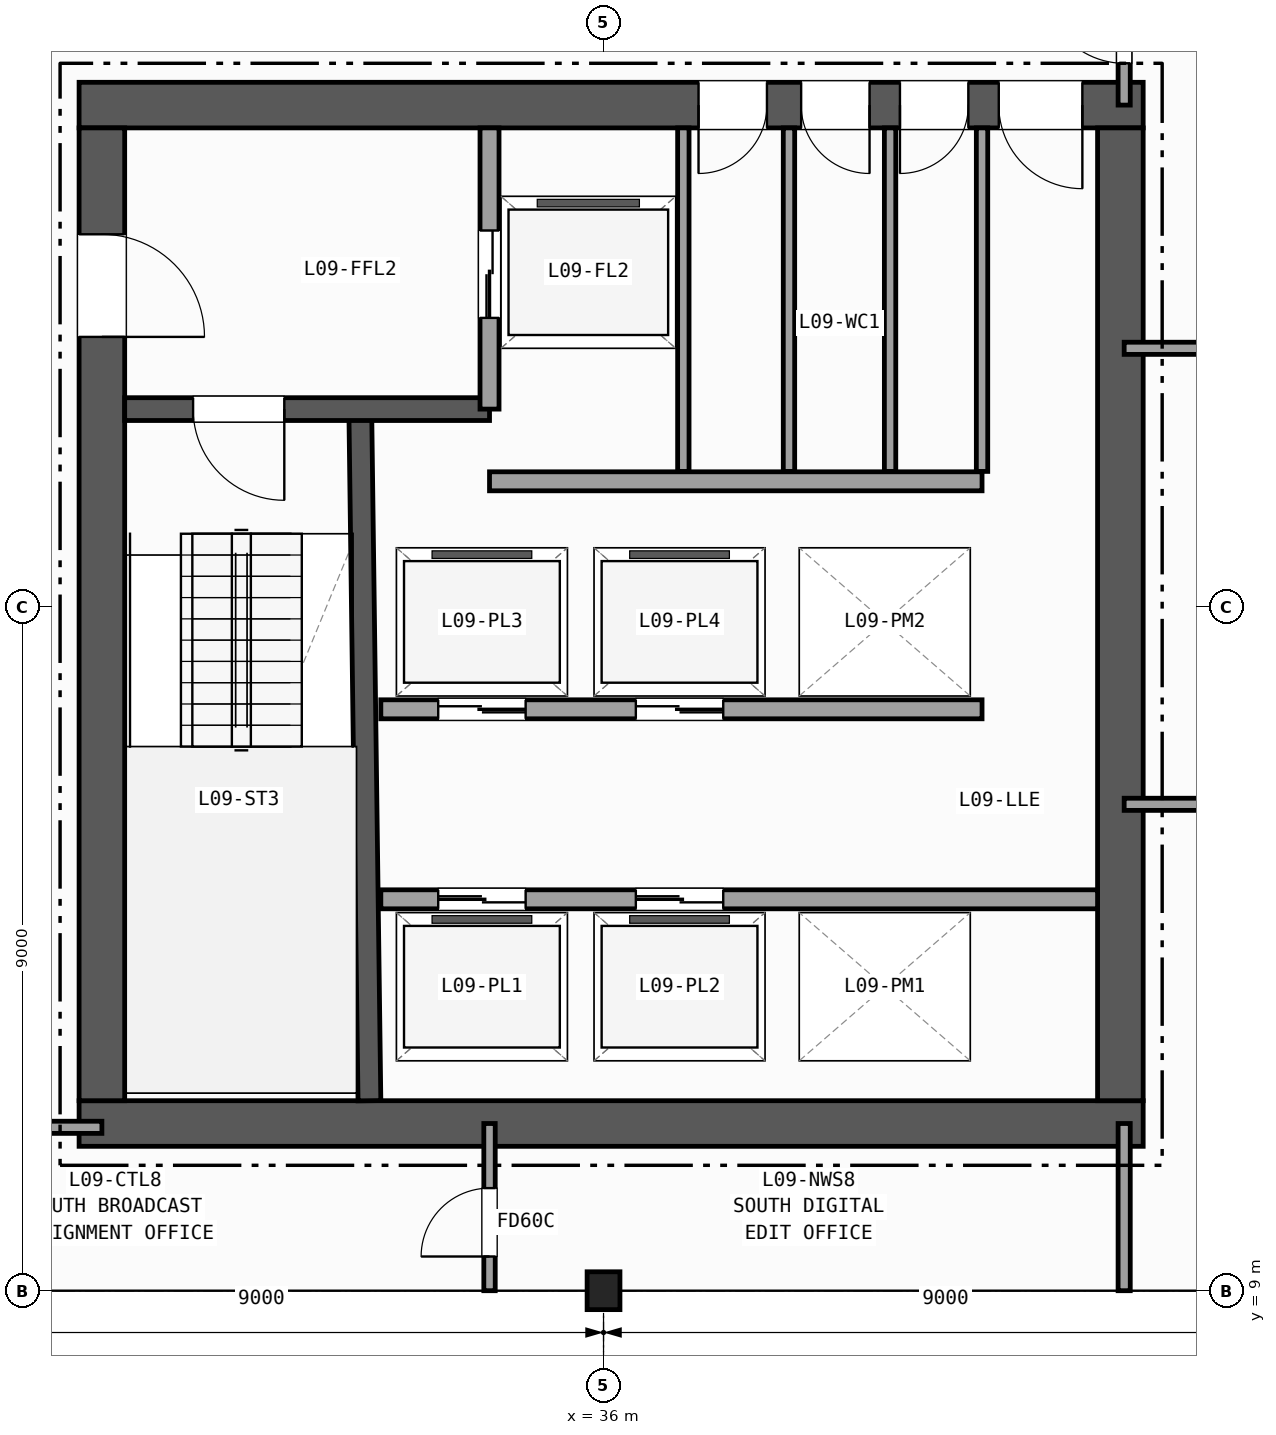
"""IFC4 building model, lengths in metres.
Left out: names, types, materials, properties, quantities, classifications, styles, units other than length and angle.
Written with IfcOpenShell. Run it as: python <this file> out.ifc"""

import sys

from ifc_helpers import new_model, si_unit, direction, frame, frame_2d, origin, origin_2d, place, context, subcontext, project, spatial, rectangle, i_section, extrude, element, fill, save


model = new_model("IFC4")
c1 = context("Model", 3, precision=1e-05, world=origin(), true_north=direction((0.0, 1.0)))
c2 = subcontext(c1, "Body", "Model", "MODEL_VIEW")
j1 = project(units=[si_unit("LENGTHUNIT", "METRE"), si_unit("PLANEANGLEUNIT", "RADIAN")], contexts=[c1])
p1 = place(None, origin())
s1 = spatial("IfcSite", under=j1, at=p1, CompositionType="ELEMENT")
p2 = place(p1, origin())
s2 = spatial("IfcBuilding", under=s1, at=p2, CompositionType="ELEMENT")
p3 = place(p2, frame((0.0, 0.0, 43.4)))
s3 = spatial("IfcBuildingStorey", under=s2, at=p3, CompositionType="ELEMENT", Elevation=43.4)
p4 = place(p3, frame((36.0, 9.0, 0.0), z_axis=(0.0, 0.0, 1.0), x_axis=(1.0, 0.0, 0.0)))
e1 = element("IfcColumn", 1, at=p4, inside=s3, PredefinedType="COLUMN", context=c2, shape_type="SweptSolid", body=[
    extrude(i_section(OverallWidth=0.432, OverallDepth=0.498, WebThickness=0.056, FlangeThickness=0.089, FilletRadius=0.015, at=origin_2d()), origin(), (0.0, 0.0, 1.0), 3.7),
])
p5 = place(p3, frame((29.1, 11.2, 0.0), z_axis=(0.0, 0.0, 1.0), x_axis=(1.0, 0.0, 0.0)))
e2 = element("IfcWall", 2, at=p5, inside=s3, PredefinedType="SHEAR", context=c2, shape_type="SweptSolid", body=[
    extrude(rectangle(XDim=14.0, YDim=0.6, at=frame_2d((7.0, 0.0))), origin(), (0.0, 0.0, 1.0), 3.42),
])
p6 = place(p3, frame((43.1, 24.6, 0.0), z_axis=(0.0, 0.0, 1.0), x_axis=(-1.0, 0.0, 0.0)))
e3 = element("IfcWall", 3, at=p6, inside=s3, PredefinedType="SHEAR", context=c2, shape_type="SweptSolid", body=[
    extrude(rectangle(XDim=14.0, YDim=0.6, at=frame_2d((7.0, 0.0))), origin(), (0.0, 0.0, 1.0), 3.42),
])
p7 = place(p6, frame((0.8, 0.0, 0.0)))
e4 = element("IfcOpeningElement", 4, at=p7, cuts=e3, PredefinedType="OPENING", context=c2, shape_type="SweptSolid", body=[
    extrude(rectangle(XDim=1.1, YDim=2.15, at=frame_2d((0.55, 1.075))), frame((0.0, 0.31, 0.0), z_axis=(0.0, -1.0, 0.0), x_axis=(1.0, 0.0, 0.0)), (0.0, 0.0, 1.0), 0.62),
])
p8 = place(p6, frame((2.3, 0.0, 0.0)))
e5 = element("IfcOpeningElement", 5, at=p8, cuts=e3, PredefinedType="OPENING", context=c2, shape_type="SweptSolid", body=[
    extrude(rectangle(XDim=0.9, YDim=2.1, at=frame_2d((0.45, 1.05))), frame((0.0, 0.31, 0.0), z_axis=(0.0, -1.0, 0.0), x_axis=(1.0, 0.0, 0.0)), (0.0, 0.0, 1.0), 0.62),
])
p9 = place(p6, frame((3.6, 0.0, 0.0)))
e6 = element("IfcOpeningElement", 6, at=p9, cuts=e3, PredefinedType="OPENING", context=c2, shape_type="SweptSolid", body=[
    extrude(rectangle(XDim=0.9, YDim=2.1, at=frame_2d((0.45, 1.05))), frame((0.0, 0.31, 0.0), z_axis=(0.0, -1.0, 0.0), x_axis=(1.0, 0.0, 0.0)), (0.0, 0.0, 1.0), 0.62),
])
p10 = place(p6, frame((4.95, 0.0, 0.0)))
e7 = element("IfcOpeningElement", 7, at=p10, cuts=e3, PredefinedType="OPENING", context=c2, shape_type="SweptSolid", body=[
    extrude(rectangle(XDim=0.9, YDim=2.1, at=frame_2d((0.45, 1.05))), frame((0.0, 0.31, 0.0), z_axis=(0.0, -1.0, 0.0), x_axis=(1.0, 0.0, 0.0)), (0.0, 0.0, 1.0), 0.62),
])
p11 = place(p3, frame((29.4, 24.3, 0.0), z_axis=(0.0, 0.0, 1.0), x_axis=(0.0, -1.0, 0.0)))
e8 = element("IfcWall", 8, at=p11, inside=s3, PredefinedType="SHEAR", context=c2, shape_type="SweptSolid", body=[
    extrude(rectangle(XDim=12.8, YDim=0.6, at=frame_2d((6.4, 0.0))), origin(), (0.0, 0.0, 1.0), 3.42),
])
p12 = place(p11, frame((1.4, 0.0, 0.0)))
e9 = element("IfcOpeningElement", 9, at=p12, cuts=e8, PredefinedType="OPENING", context=c2, shape_type="SweptSolid", body=[
    extrude(rectangle(XDim=1.35, YDim=2.15, at=frame_2d((0.675, 1.075))), frame((0.0, 0.31, 0.0), z_axis=(0.0, -1.0, 0.0), x_axis=(1.0, 0.0, 0.0)), (0.0, 0.0, 1.0), 0.62),
])
p13 = place(p3, frame((42.8, 11.5, 0.0), z_axis=(0.0, 0.0, 1.0), x_axis=(0.0, 1.0, 0.0)))
e10 = element("IfcWall", 10, at=p13, inside=s3, PredefinedType="SHEAR", context=c2, shape_type="SweptSolid", body=[
    extrude(rectangle(XDim=12.8, YDim=0.6, at=frame_2d((6.4, 0.0))), origin(), (0.0, 0.0, 1.0), 3.42),
])
p14 = place(p3, frame((32.92, 11.5, 0.0), z_axis=(0.0, 0.0, 1.0), x_axis=(-0.013244407292, 0.999912288991, 0.0)))
e11 = element("IfcWall", 11, at=p14, inside=s3, PredefinedType="SHEAR", context=c2, shape_type="SweptSolid", body=[
    extrude(rectangle(XDim=9.051, YDim=0.3, at=frame_2d((4.525, 0.0))), origin(), (0.0, 0.0, 1.0), 3.42),
])
p15 = place(p3, frame((34.5, 20.6, 0.0), z_axis=(0.0, 0.0, 1.0), x_axis=(-1.0, 0.0, 0.0)))
e12 = element("IfcWall", 12, at=p15, inside=s3, PredefinedType="SHEAR", context=c2, shape_type="SweptSolid", body=[
    extrude(rectangle(XDim=4.8, YDim=0.3, at=frame_2d((2.4, 0.0))), origin(), (0.0, 0.0, 1.0), 3.42),
])
p16 = place(p15, frame((2.7, 0.0, 0.0)))
e13 = element("IfcOpeningElement", 13, at=p16, cuts=e12, PredefinedType="OPENING", context=c2, shape_type="SweptSolid", body=[
    extrude(rectangle(XDim=1.2, YDim=2.15, at=frame_2d((0.6, 1.075))), frame((0.0, 0.16, 0.0), z_axis=(0.0, -1.0, 0.0), x_axis=(1.0, 0.0, 0.0)), (0.0, 0.0, 1.0), 0.32),
])
p17 = place(p3, frame((34.5, 20.6, 0.0), z_axis=(0.0, 0.0, 1.0), x_axis=(0.0, 1.0, 0.0)))
e14 = element("IfcWall", 14, at=p17, inside=s3, PredefinedType="PARTITIONING", context=c2, shape_type="SweptSolid", body=[
    extrude(rectangle(XDim=3.7, YDim=0.25, at=frame_2d((1.85, 0.0))), origin(), (0.0, 0.0, 1.0), 3.42),
])
p18 = place(p17, frame((1.2, 0.0, 0.0)))
e15 = element("IfcOpeningElement", 15, at=p18, cuts=e14, PredefinedType="OPENING", context=c2, shape_type="SweptSolid", body=[
    extrude(rectangle(XDim=1.15, YDim=2.15, at=frame_2d((0.575, 1.075))), frame((0.0, 0.135, 0.0), z_axis=(0.0, -1.0, 0.0), x_axis=(1.0, 0.0, 0.0)), (0.0, 0.0, 1.0), 0.27),
])
p19 = place(p3, frame((34.5, 19.65, 0.0), z_axis=(0.0, 0.0, 1.0), x_axis=(1.0, 0.0, 0.0)))
e16 = element("IfcWall", 16, at=p19, inside=s3, PredefinedType="PARTITIONING", context=c2, shape_type="SweptSolid", body=[
    extrude(rectangle(XDim=6.48, YDim=0.25, at=frame_2d((3.24, 0.0))), origin(), (0.0, 0.0, 1.0), 3.42),
])
p20 = place(p3, frame((33.07, 14.15, 0.0), z_axis=(0.0, 0.0, 1.0), x_axis=(1.0, 0.0, 0.0)))
e17 = element("IfcWall", 17, at=p20, inside=s3, PredefinedType="PARTITIONING", context=c2, shape_type="SweptSolid", body=[
    extrude(rectangle(XDim=9.43, YDim=0.25, at=frame_2d((4.715, 0.0))), origin(), (0.0, 0.0, 1.0), 3.42),
])
p21 = place(p20, frame((0.755, 0.0, 0.0)))
e18 = element("IfcOpeningElement", 18, at=p21, cuts=e17, PredefinedType="OPENING", context=c2, shape_type="SweptSolid", body=[
    extrude(rectangle(XDim=1.15, YDim=2.15, at=frame_2d((0.575, 1.075))), frame((0.0, 0.135, 0.0), z_axis=(0.0, -1.0, 0.0), x_axis=(1.0, 0.0, 0.0)), (0.0, 0.0, 1.0), 0.27),
])
p22 = place(p20, frame((3.355, 0.0, 0.0)))
e19 = element("IfcOpeningElement", 19, at=p22, cuts=e17, PredefinedType="OPENING", context=c2, shape_type="SweptSolid", body=[
    extrude(rectangle(XDim=1.15, YDim=2.15, at=frame_2d((0.575, 1.075))), frame((0.0, 0.135, 0.0), z_axis=(0.0, -1.0, 0.0), x_axis=(1.0, 0.0, 0.0)), (0.0, 0.0, 1.0), 0.27),
])
p23 = place(p3, frame((40.98, 16.65, 0.0), z_axis=(0.0, 0.0, 1.0), x_axis=(-1.0, 0.0, 0.0)))
e20 = element("IfcWall", 20, at=p23, inside=s3, PredefinedType="PARTITIONING", context=c2, shape_type="SweptSolid", body=[
    extrude(rectangle(XDim=7.91, YDim=0.25, at=frame_2d((3.955, 0.0))), origin(), (0.0, 0.0, 1.0), 3.42),
])
p24 = place(p23, frame((6.005, 0.0, 0.0)))
e21 = element("IfcOpeningElement", 21, at=p24, cuts=e20, PredefinedType="OPENING", context=c2, shape_type="SweptSolid", body=[
    extrude(rectangle(XDim=1.15, YDim=2.15, at=frame_2d((0.575, 1.075))), frame((0.0, 0.135, 0.0), z_axis=(0.0, -1.0, 0.0), x_axis=(1.0, 0.0, 0.0)), (0.0, 0.0, 1.0), 0.27),
])
p25 = place(p23, frame((3.405, 0.0, 0.0)))
e22 = element("IfcOpeningElement", 22, at=p25, cuts=e20, PredefinedType="OPENING", context=c2, shape_type="SweptSolid", body=[
    extrude(rectangle(XDim=1.15, YDim=2.15, at=frame_2d((0.575, 1.075))), frame((0.0, 0.135, 0.0), z_axis=(0.0, -1.0, 0.0), x_axis=(1.0, 0.0, 0.0)), (0.0, 0.0, 1.0), 0.27),
])
for number, where, z_axis, x_axis in (
    (23, (37.05, 19.78, 0.0), (0.0, 0.0, 1.0), (0.0, 1.0, 0.0)),
    (24, (38.44, 19.78, 0.0), (0.0, 0.0, 1.0), (0.0, 1.0, 0.0)),
    (25, (39.77, 19.78, 0.0), (0.0, 0.0, 1.0), (0.0, 1.0, 0.0)),
    (26, (40.98, 19.78, 0.0), (0.0, 0.0, 1.0), (0.0, 1.0, 0.0)),
):
    element("IfcWall", number, at=place(p3, frame(where, z_axis=z_axis, x_axis=x_axis)), inside=s3, PredefinedType="PARTITIONING", context=c2, shape_type="SweptSolid", body=[
        extrude(rectangle(XDim=4.52, YDim=0.15, at=frame_2d((2.26, 0.0))), origin(), (0.0, 0.0, 1.0), 3.42),
    ])
p26 = place(p3, frame((24.65, 11.15, 0.0), z_axis=(0.0, 0.0, 1.0), x_axis=(1.0, 0.0, 0.0)))
e27 = element("IfcWall", 27, at=p26, inside=s3, PredefinedType="PARTITIONING", context=c2, shape_type="SweptSolid", body=[
    extrude(rectangle(XDim=4.75, YDim=0.16, at=frame_2d((2.375, 0.0))), origin(), (0.0, 0.0, 1.0), 2.792),
])
p27 = place(p26, frame((1.2, 0.0, 0.0)))
e28 = element("IfcOpeningElement", 28, at=p27, cuts=e27, PredefinedType="OPENING", context=c2, shape_type="SweptSolid", body=[
    extrude(rectangle(XDim=0.95, YDim=2.1, at=frame_2d((0.475, 1.05))), frame((0.0, 0.09, 0.0), z_axis=(0.0, -1.0, 0.0), x_axis=(1.0, 0.0, 0.0)), (0.0, 0.0, 1.0), 0.18),
])
p28 = place(p3, frame((34.5, 9.0, 0.0), z_axis=(0.0, 0.0, 1.0), x_axis=(0.0, 1.0, 0.0)))
e29 = element("IfcWall", 29, at=p28, inside=s3, PredefinedType="PARTITIONING", context=c2, shape_type="SweptSolid", body=[
    extrude(rectangle(XDim=2.2, YDim=0.15, at=frame_2d((1.1, 0.0))), origin(), (0.0, 0.0, 1.0), 2.627),
])
p29 = place(p28, frame((0.45, 0.0, 0.0)))
e30 = element("IfcOpeningElement", 30, at=p29, cuts=e29, PredefinedType="OPENING", context=c2, shape_type="SweptSolid", body=[
    extrude(rectangle(XDim=0.9, YDim=2.1, at=frame_2d((0.45, 1.05))), frame((0.0, 0.085, 0.0), z_axis=(0.0, -1.0, 0.0), x_axis=(1.0, 0.0, 0.0)), (0.0, 0.0, 1.0), 0.17),
])
p30 = place(p3, frame((42.85, 9.0, 0.0), z_axis=(0.0, 0.0, 1.0), x_axis=(0.0, 1.0, 0.0)))
e31 = element("IfcWall", 31, at=p30, inside=s3, PredefinedType="PARTITIONING", context=c2, shape_type="SweptSolid", body=[
    extrude(rectangle(XDim=2.2, YDim=0.16, at=frame_2d((1.1, 0.0))), origin(), (0.0, 0.0, 1.0), 2.627),
])
p31 = place(p3, frame((42.85, 24.6, 0.0), z_axis=(0.0, 0.0, 1.0), x_axis=(0.0, 1.0, 0.0)))
e32 = element("IfcWall", 32, at=p31, inside=s3, PredefinedType="PARTITIONING", context=c2, shape_type="SweptSolid", body=[
    extrude(rectangle(XDim=2.4, YDim=0.16, at=frame_2d((1.2, 0.0))), origin(), (0.0, 0.0, 1.0), 2.627),
])
p32 = place(p31, frame((0.55, 0.0, 0.0)))
e33 = element("IfcOpeningElement", 33, at=p32, cuts=e32, PredefinedType="OPENING", context=c2, shape_type="SweptSolid", body=[
    extrude(rectangle(XDim=1.05, YDim=2.15, at=frame_2d((0.525, 1.075))), frame((0.0, 0.09, 0.0), z_axis=(0.0, -1.0, 0.0), x_axis=(1.0, 0.0, 0.0)), (0.0, 0.0, 1.0), 0.18),
])
p33 = place(p3, frame((42.85, 15.4, 0.0), z_axis=(0.0, 0.0, 1.0), x_axis=(1.0, 0.0, 0.0)))
e34 = element("IfcWall", 34, at=p33, inside=s3, PredefinedType="PARTITIONING", context=c2, shape_type="SweptSolid", body=[
    extrude(rectangle(XDim=20.582, YDim=0.16, at=frame_2d((10.291, 0.0))), origin(), (0.0, 0.0, 1.0), 3.42),
])
p34 = place(p33, frame((3.4, 0.0, 0.0)))
e35 = element("IfcOpeningElement", 35, at=p34, cuts=e34, PredefinedType="OPENING", context=c2, shape_type="SweptSolid", body=[
    extrude(rectangle(XDim=1.2, YDim=2.15, at=frame_2d((0.6, 1.075))), frame((0.0, 0.09, 0.0), z_axis=(0.0, -1.0, 0.0), x_axis=(1.0, 0.0, 0.0)), (0.0, 0.0, 1.0), 0.18),
])
p35 = place(p3, frame((42.85, 21.4, 0.0), z_axis=(0.0, 0.0, 1.0), x_axis=(1.0, 0.0, 0.0)))
e36 = element("IfcWall", 36, at=p35, inside=s3, PredefinedType="PARTITIONING", context=c2, shape_type="SweptSolid", body=[
    extrude(rectangle(XDim=20.5, YDim=0.16, at=frame_2d((10.25, 0.0))), origin(), (0.0, 0.0, 1.0), 3.42),
])
p36 = place(p35, frame((3.4, 0.0, 0.0)))
e37 = element("IfcOpeningElement", 37, at=p36, cuts=e36, PredefinedType="OPENING", context=c2, shape_type="SweptSolid", body=[
    extrude(rectangle(XDim=0.86, YDim=2.05, at=frame_2d((0.43, 1.025))), frame((0.0, 0.09, 0.0), z_axis=(0.0, -1.0, 0.0), x_axis=(1.0, 0.0, 0.0)), (0.0, 0.0, 1.0), 0.18),
])
p37 = place(p16, origin())
e38 = element("IfcDoor", 38, at=p37, inside=s3, OperationType="SINGLE_SWING_LEFT", PredefinedType="DOOR", context=c2, shape_type="SweptSolid", body=[
    extrude(rectangle(XDim=1.2, YDim=2.15, at=frame_2d((0.6, 1.075))), frame((0.0, 0.025, 0.0), z_axis=(0.0, -1.0, 0.0), x_axis=(1.0, 0.0, 0.0)), (0.0, 0.0, 1.0), 0.05),
])
fill(e13, e38)
p38 = place(p12, origin())
e39 = element("IfcDoor", 39, at=p38, inside=s3, OperationType="SINGLE_SWING_RIGHT", PredefinedType="DOOR", context=c2, shape_type="SweptSolid", body=[
    extrude(rectangle(XDim=1.35, YDim=2.15, at=frame_2d((0.675, 1.075))), frame((0.0, 0.025, 0.0), z_axis=(0.0, -1.0, 0.0), x_axis=(1.0, 0.0, 0.0)), (0.0, 0.0, 1.0), 0.05),
])
fill(e9, e39)
p39 = place(p7, origin())
e40 = element("IfcDoor", 40, at=p39, inside=s3, OperationType="SINGLE_SWING_LEFT", PredefinedType="DOOR", context=c2, shape_type="SweptSolid", body=[
    extrude(rectangle(XDim=1.1, YDim=2.15, at=frame_2d((0.55, 1.075))), frame((0.0, 0.025, 0.0), z_axis=(0.0, -1.0, 0.0), x_axis=(1.0, 0.0, 0.0)), (0.0, 0.0, 1.0), 0.05),
])
fill(e4, e40)
p40 = place(p8, origin())
e41 = element("IfcDoor", 41, at=p40, inside=s3, OperationType="SINGLE_SWING_RIGHT", PredefinedType="DOOR", context=c2, shape_type="SweptSolid", body=[
    extrude(rectangle(XDim=0.9, YDim=2.1, at=frame_2d((0.45, 1.05))), frame((0.0, 0.025, 0.0), z_axis=(0.0, -1.0, 0.0), x_axis=(1.0, 0.0, 0.0)), (0.0, 0.0, 1.0), 0.05),
])
fill(e5, e41)
p41 = place(p9, origin())
e42 = element("IfcDoor", 42, at=p41, inside=s3, OperationType="SINGLE_SWING_LEFT", PredefinedType="DOOR", context=c2, shape_type="SweptSolid", body=[
    extrude(rectangle(XDim=0.9, YDim=2.1, at=frame_2d((0.45, 1.05))), frame((0.0, 0.025, 0.0), z_axis=(0.0, -1.0, 0.0), x_axis=(1.0, 0.0, 0.0)), (0.0, 0.0, 1.0), 0.05),
])
fill(e6, e42)
p42 = place(p10, origin())
e43 = element("IfcDoor", 43, at=p42, inside=s3, OperationType="SINGLE_SWING_RIGHT", PredefinedType="DOOR", context=c2, shape_type="SweptSolid", body=[
    extrude(rectangle(XDim=0.9, YDim=2.1, at=frame_2d((0.45, 1.05))), frame((0.0, 0.025, 0.0), z_axis=(0.0, -1.0, 0.0), x_axis=(1.0, 0.0, 0.0)), (0.0, 0.0, 1.0), 0.05),
])
fill(e7, e43)
p43 = place(p18, origin())
e44 = element("IfcDoor", 44, at=p43, inside=s3, OperationType="DOUBLE_DOOR_SLIDING", PredefinedType="DOOR", context=c2, shape_type="SweptSolid", body=[
    extrude(rectangle(XDim=1.15, YDim=2.15, at=frame_2d((0.575, 1.075))), frame((0.0, 0.025, 0.0), z_axis=(0.0, -1.0, 0.0), x_axis=(1.0, 0.0, 0.0)), (0.0, 0.0, 1.0), 0.05),
])
fill(e15, e44)
p44 = place(p21, origin())
e45 = element("IfcDoor", 45, at=p44, inside=s3, OperationType="DOUBLE_DOOR_SLIDING", PredefinedType="DOOR", context=c2, shape_type="SweptSolid", body=[
    extrude(rectangle(XDim=1.15, YDim=2.15, at=frame_2d((0.575, 1.075))), frame((0.0, 0.025, 0.0), z_axis=(0.0, -1.0, 0.0), x_axis=(1.0, 0.0, 0.0)), (0.0, 0.0, 1.0), 0.05),
])
fill(e18, e45)
p45 = place(p22, origin())
e46 = element("IfcDoor", 46, at=p45, inside=s3, OperationType="DOUBLE_DOOR_SLIDING", PredefinedType="DOOR", context=c2, shape_type="SweptSolid", body=[
    extrude(rectangle(XDim=1.15, YDim=2.15, at=frame_2d((0.575, 1.075))), frame((0.0, 0.025, 0.0), z_axis=(0.0, -1.0, 0.0), x_axis=(1.0, 0.0, 0.0)), (0.0, 0.0, 1.0), 0.05),
])
fill(e19, e46)
p46 = place(p24, origin())
e47 = element("IfcDoor", 47, at=p46, inside=s3, OperationType="DOUBLE_DOOR_SLIDING", PredefinedType="DOOR", context=c2, shape_type="SweptSolid", body=[
    extrude(rectangle(XDim=1.15, YDim=2.15, at=frame_2d((0.575, 1.075))), frame((0.0, 0.025, 0.0), z_axis=(0.0, -1.0, 0.0), x_axis=(1.0, 0.0, 0.0)), (0.0, 0.0, 1.0), 0.05),
])
fill(e21, e47)
p47 = place(p25, origin())
e48 = element("IfcDoor", 48, at=p47, inside=s3, OperationType="DOUBLE_DOOR_SLIDING", PredefinedType="DOOR", context=c2, shape_type="SweptSolid", body=[
    extrude(rectangle(XDim=1.15, YDim=2.15, at=frame_2d((0.575, 1.075))), frame((0.0, 0.025, 0.0), z_axis=(0.0, -1.0, 0.0), x_axis=(1.0, 0.0, 0.0)), (0.0, 0.0, 1.0), 0.05),
])
fill(e22, e48)
p48 = place(p29, origin())
e49 = element("IfcDoor", 49, at=p48, inside=s3, OperationType="SINGLE_SWING_LEFT", PredefinedType="DOOR", context=c2, shape_type="SweptSolid", body=[
    extrude(rectangle(XDim=0.9, YDim=2.1, at=frame_2d((0.45, 1.05))), frame((0.0, 0.025, 0.0), z_axis=(0.0, -1.0, 0.0), x_axis=(1.0, 0.0, 0.0)), (0.0, 0.0, 1.0), 0.05),
])
fill(e30, e49)
p49 = place(p32, origin())
e50 = element("IfcDoor", 50, at=p49, inside=s3, OperationType="SINGLE_SWING_RIGHT", PredefinedType="DOOR", context=c2, shape_type="SweptSolid", body=[
    extrude(rectangle(XDim=1.05, YDim=2.15, at=frame_2d((0.525, 1.075))), frame((0.0, 0.025, 0.0), z_axis=(0.0, -1.0, 0.0), x_axis=(1.0, 0.0, 0.0)), (0.0, 0.0, 1.0), 0.05),
])
fill(e33, e50)
save(model, sys.argv[1])
